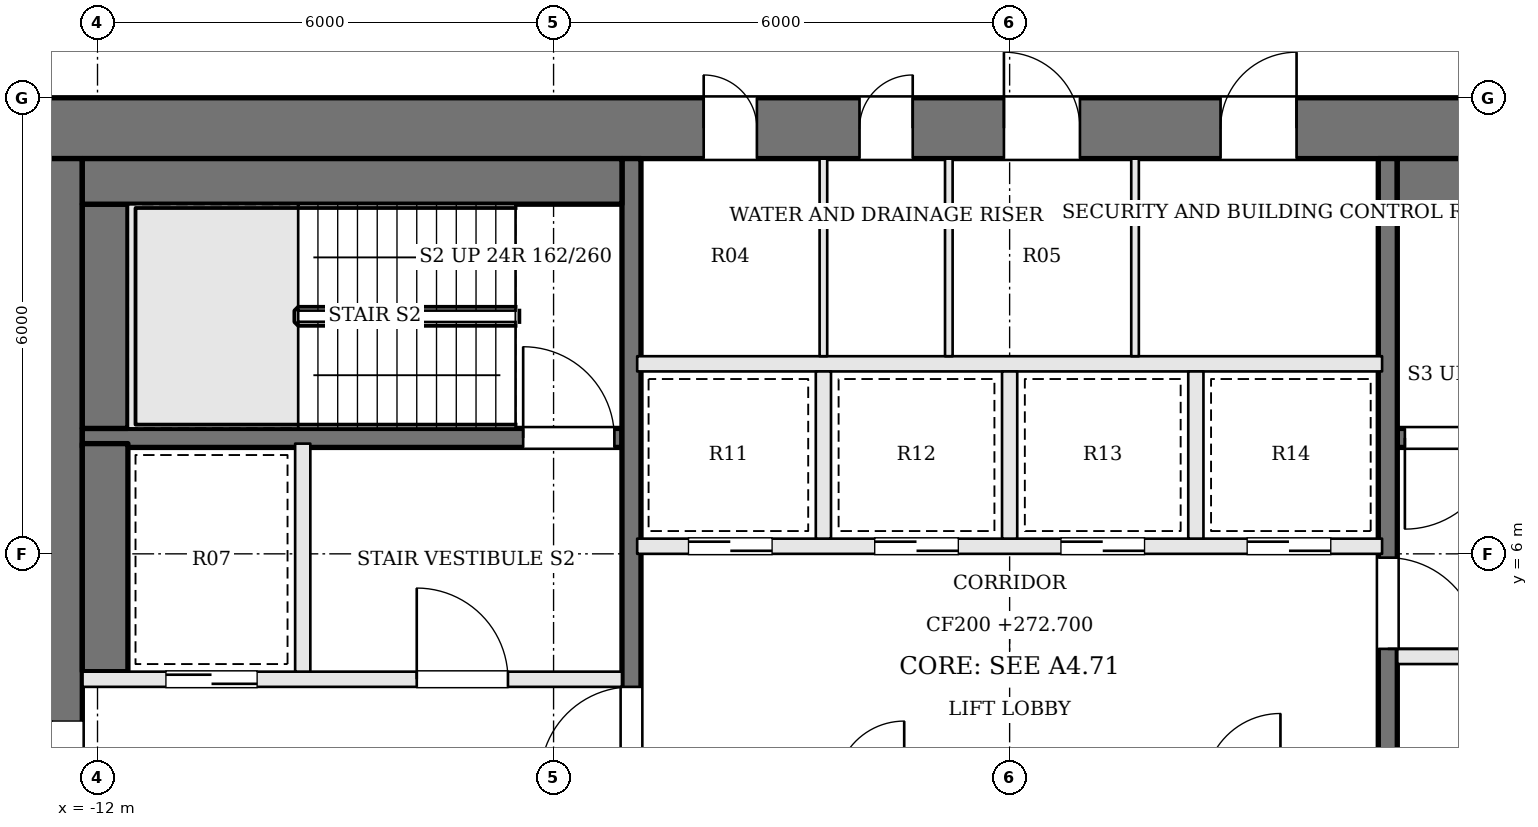
"""IFC4 building model, lengths in metres.
Left out: names, types, materials, properties, quantities, classifications, styles, units other than length and angle.
Written with IfcOpenShell. Run it as: python <this file> out.ifc"""

import sys

from ifc_helpers import new_model, si_unit, direction, frame, frame_2d, origin, place, context, subcontext, project, spatial, rectangle, extrude, element, fill, save


model = new_model("IFC4")
c1 = context("Model", 3, precision=1e-05, world=origin(), true_north=direction((0.0, 1.0)))
c2 = subcontext(c1, "Body", "Model", "MODEL_VIEW")
j1 = project(units=[si_unit("LENGTHUNIT", "METRE"), si_unit("PLANEANGLEUNIT", "RADIAN")], contexts=[c1])
p1 = place(None, origin())
s1 = spatial("IfcSite", under=j1, at=p1, CompositionType="ELEMENT")
p2 = place(p1, origin())
s2 = spatial("IfcBuilding", under=s1, at=p2, CompositionType="ELEMENT")
p3 = place(p2, frame((0.0, 0.0, 272.7)))
s3 = spatial("IfcBuildingStorey", under=s2, at=p3, CompositionType="ELEMENT", Elevation=272.7)
p4 = place(p3, frame((-13.0, 11.6, 0.0), z_axis=(0.0, 0.0, 1.0), x_axis=(1.0, 0.0, 0.0)))
e1 = element("IfcWall", 1, at=p4, inside=s3, PredefinedType="SHEAR", context=c2, shape_type="SweptSolid", body=[
    extrude(rectangle(XDim=26.0, YDim=0.8, at=frame_2d((13.0, 0.0))), origin(), (0.0, 0.0, 1.0), 3.9),
])
p5 = place(p4, frame((8.975, 0.0, 0.0)))
e2 = element("IfcOpeningElement", 2, at=p5, cuts=e1, PredefinedType="OPENING", context=c2, shape_type="SweptSolid", body=[
    extrude(rectangle(XDim=0.7, YDim=2.1, at=frame_2d((0.35, 1.05))), frame((0.0, 0.41, 0.0), z_axis=(0.0, -1.0, 0.0), x_axis=(1.0, 0.0, 0.0)), (0.0, 0.0, 1.0), 0.82),
])
p6 = place(p4, frame((11.025, 0.0, 0.0)))
e3 = element("IfcOpeningElement", 3, at=p6, cuts=e1, PredefinedType="OPENING", context=c2, shape_type="SweptSolid", body=[
    extrude(rectangle(XDim=0.7, YDim=2.1, at=frame_2d((0.35, 1.05))), frame((0.0, 0.41, 0.0), z_axis=(0.0, -1.0, 0.0), x_axis=(1.0, 0.0, 0.0)), (0.0, 0.0, 1.0), 0.82),
])
p7 = place(p4, frame((12.925, 0.0, 0.0)))
e4 = element("IfcOpeningElement", 4, at=p7, cuts=e1, PredefinedType="OPENING", context=c2, shape_type="SweptSolid", body=[
    extrude(rectangle(XDim=1.0, YDim=2.1, at=frame_2d((0.5, 1.05))), frame((0.0, 0.41, 0.0), z_axis=(0.0, -1.0, 0.0), x_axis=(1.0, 0.0, 0.0)), (0.0, 0.0, 1.0), 0.82),
])
p8 = place(p4, frame((15.775, 0.0, 0.0)))
e5 = element("IfcOpeningElement", 5, at=p8, cuts=e1, PredefinedType="OPENING", context=c2, shape_type="SweptSolid", body=[
    extrude(rectangle(XDim=1.0, YDim=2.1, at=frame_2d((0.5, 1.05))), frame((0.0, 0.41, 0.0), z_axis=(0.0, -1.0, 0.0), x_axis=(1.0, 0.0, 0.0)), (0.0, 0.0, 1.0), 0.82),
])
p9 = place(p3, frame((-12.6, -2.2, 0.0), z_axis=(0.0, 0.0, 1.0), x_axis=(0.0, 1.0, 0.0)))
e6 = element("IfcWall", 6, at=p9, inside=s3, PredefinedType="SHEAR", context=c2, shape_type="SweptSolid", body=[
    extrude(rectangle(XDim=13.4, YDim=0.8, at=frame_2d((6.7, 0.0))), origin(), (0.0, 0.0, 1.0), 3.9),
])
p10 = place(p9, frame((4.2, 0.0, 0.0)))
e7 = element("IfcOpeningElement", 7, at=p10, cuts=e6, PredefinedType="OPENING", context=c2, shape_type="SweptSolid", body=[
    extrude(rectangle(XDim=1.8, YDim=2.1, at=frame_2d((0.9, 1.05))), frame((0.0, 0.41, 0.0), z_axis=(0.0, -1.0, 0.0), x_axis=(1.0, 0.0, 0.0)), (0.0, 0.0, 1.0), 0.82),
])
p11 = place(p3, frame((12.2, 7.525, 0.0), z_axis=(0.0, 0.0, 1.0), x_axis=(-1.0, 0.0, 0.0)))
e8 = element("IfcWall", 8, at=p11, inside=s3, PredefinedType="SOLIDWALL", context=c2, shape_type="SweptSolid", body=[
    extrude(rectangle(XDim=7.1, YDim=0.25, at=frame_2d((3.55, 0.0))), origin(), (0.0, 0.0, 1.0), 3.7),
])
p12 = place(p11, frame((5.8, 0.0, 0.0)))
e9 = element("IfcOpeningElement", 9, at=p12, cuts=e8, PredefinedType="OPENING", context=c2, shape_type="SweptSolid", body=[
    extrude(rectangle(XDim=1.2, YDim=2.1, at=frame_2d((0.6, 1.05))), frame((0.0, 0.135, 0.0), z_axis=(0.0, -1.0, 0.0), x_axis=(1.0, 0.0, 0.0)), (0.0, 0.0, 1.0), 0.27),
])
p13 = place(p3, frame((-12.2, 4.35, 0.0), z_axis=(0.0, 0.0, 1.0), x_axis=(1.0, 0.0, 0.0)))
e10 = element("IfcWall", 10, at=p13, inside=s3, PredefinedType="SOLIDWALL", context=c2, shape_type="SweptSolid", body=[
    extrude(rectangle(XDim=7.1, YDim=0.2, at=frame_2d((3.55, 0.0))), origin(), (0.0, 0.0, 1.0), 3.7),
])
p14 = place(p13, frame((4.4, 0.0, 0.0)))
e11 = element("IfcOpeningElement", 11, at=p14, cuts=e10, PredefinedType="OPENING", context=c2, shape_type="SweptSolid", body=[
    extrude(rectangle(XDim=1.2, YDim=2.1, at=frame_2d((0.6, 1.05))), frame((0.0, 0.11, 0.0), z_axis=(0.0, -1.0, 0.0), x_axis=(1.0, 0.0, 0.0)), (0.0, 0.0, 1.0), 0.22),
])
p15 = place(p13, frame((1.1, 0.0, 0.0)))
e12 = element("IfcOpeningElement", 12, at=p15, cuts=e10, PredefinedType="OPENING", context=c2, shape_type="SweptSolid", body=[
    extrude(rectangle(XDim=1.2, YDim=2.1, at=frame_2d((0.6, 1.05))), frame((0.0, 0.11, 0.0), z_axis=(0.0, -1.0, 0.0), x_axis=(1.0, 0.0, 0.0)), (0.0, 0.0, 1.0), 0.22),
])
p16 = place(p3, frame((12.2, 4.65, 0.0), z_axis=(0.0, 0.0, 1.0), x_axis=(-1.0, 0.0, 0.0)))
e13 = element("IfcWall", 13, at=p16, inside=s3, PredefinedType="SOLIDWALL", context=c2, shape_type="SweptSolid", body=[
    extrude(rectangle(XDim=7.1, YDim=0.2, at=frame_2d((3.55, 0.0))), origin(), (0.0, 0.0, 1.0), 3.7),
])
p17 = place(p16, frame((4.4, 0.0, 0.0)))
e14 = element("IfcOpeningElement", 14, at=p17, cuts=e13, PredefinedType="OPENING", context=c2, shape_type="SweptSolid", body=[
    extrude(rectangle(XDim=1.2, YDim=2.1, at=frame_2d((0.6, 1.05))), frame((0.0, 0.11, 0.0), z_axis=(0.0, -1.0, 0.0), x_axis=(1.0, 0.0, 0.0)), (0.0, 0.0, 1.0), 0.22),
])
p18 = place(p16, frame((1.1, 0.0, 0.0)))
e15 = element("IfcOpeningElement", 15, at=p18, cuts=e13, PredefinedType="OPENING", context=c2, shape_type="SweptSolid", body=[
    extrude(rectangle(XDim=1.2, YDim=2.1, at=frame_2d((0.6, 1.05))), frame((0.0, 0.11, 0.0), z_axis=(0.0, -1.0, 0.0), x_axis=(1.0, 0.0, 0.0)), (0.0, 0.0, 1.0), 0.22),
])
p19 = place(p3, frame((-12.2, 7.525, 0.0), z_axis=(0.0, 0.0, 1.0), x_axis=(1.0, 0.0, 0.0)))
e16 = element("IfcWall", 16, at=p19, inside=s3, PredefinedType="SOLIDWALL", context=c2, shape_type="SweptSolid", body=[
    extrude(rectangle(XDim=7.1, YDim=0.25, at=frame_2d((3.55, 0.0))), origin(), (0.0, 0.0, 1.0), 3.7),
])
p20 = place(p19, frame((5.8, 0.0, 0.0)))
e17 = element("IfcOpeningElement", 17, at=p20, cuts=e16, PredefinedType="OPENING", context=c2, shape_type="SweptSolid", body=[
    extrude(rectangle(XDim=1.2, YDim=2.1, at=frame_2d((0.6, 1.05))), frame((0.0, 0.135, 0.0), z_axis=(0.0, -1.0, 0.0), x_axis=(1.0, 0.0, 0.0)), (0.0, 0.0, 1.0), 0.27),
])
p21 = place(p3, frame((-9.3, 4.45, 0.0), z_axis=(0.0, 0.0, 1.0), x_axis=(0.0, 1.0, 0.0)))
e18 = element("IfcWall", 18, at=p21, inside=s3, PredefinedType="SOLIDWALL", context=c2, shape_type="SweptSolid", body=[
    extrude(rectangle(XDim=3.0, YDim=0.2, at=frame_2d((1.5, 0.0))), origin(), (0.0, 0.0, 1.0), 3.7),
])
p22 = place(p3, frame((-4.975, -2.2, 0.0), z_axis=(0.0, 0.0, 1.0), x_axis=(0.0, 1.0, 0.0)))
e19 = element("IfcWall", 19, at=p22, inside=s3, PredefinedType="SOLIDWALL", context=c2, shape_type="SweptSolid", body=[
    extrude(rectangle(XDim=13.4, YDim=0.25, at=frame_2d((6.7, 0.0))), origin(), (0.0, 0.0, 1.0), 3.7),
])
p23 = place(p22, frame((5.25, 0.0, 0.0)))
e20 = element("IfcOpeningElement", 20, at=p23, cuts=e19, PredefinedType="OPENING", context=c2, shape_type="SweptSolid", body=[
    extrude(rectangle(XDim=1.2, YDim=2.1, at=frame_2d((0.6, 1.05))), frame((0.0, 0.135, 0.0), z_axis=(0.0, -1.0, 0.0), x_axis=(1.0, 0.0, 0.0)), (0.0, 0.0, 1.0), 0.27),
])
p24 = place(p3, frame((4.975, 11.2, 0.0), z_axis=(0.0, 0.0, 1.0), x_axis=(0.0, -1.0, 0.0)))
e21 = element("IfcWall", 21, at=p24, inside=s3, PredefinedType="SOLIDWALL", context=c2, shape_type="SweptSolid", body=[
    extrude(rectangle(XDim=13.4, YDim=0.25, at=frame_2d((6.7, 0.0))), origin(), (0.0, 0.0, 1.0), 3.7),
])
p25 = place(p24, frame((5.25, 0.0, 0.0)))
e22 = element("IfcOpeningElement", 22, at=p25, cuts=e21, PredefinedType="OPENING", context=c2, shape_type="SweptSolid", body=[
    extrude(rectangle(XDim=1.2, YDim=2.1, at=frame_2d((0.6, 1.05))), frame((0.0, 0.135, 0.0), z_axis=(0.0, -1.0, 0.0), x_axis=(1.0, 0.0, 0.0)), (0.0, 0.0, 1.0), 0.27),
])
p26 = place(p3, frame((-11.9, 4.45, 0.0), z_axis=(0.0, 0.0, 1.0), x_axis=(0.0, 1.0, 0.0)))
e23 = element("IfcWall", 23, at=p26, inside=s3, PredefinedType="SOLIDWALL", context=c2, shape_type="SweptSolid", body=[
    extrude(rectangle(XDim=3.0, YDim=0.6, at=frame_2d((1.5, 0.0))), origin(), (0.0, 0.0, 1.0), 3.7),
])
p27 = place(p3, frame((-11.9, 7.65, 0.0), z_axis=(0.0, 0.0, 1.0), x_axis=(0.0, 1.0, 0.0)))
e24 = element("IfcWall", 24, at=p27, inside=s3, PredefinedType="SOLIDWALL", context=c2, shape_type="SweptSolid", body=[
    extrude(rectangle(XDim=2.95, YDim=0.6, at=frame_2d((1.475, 0.0))), origin(), (0.0, 0.0, 1.0), 3.7),
])
for number, where, z_axis, x_axis in (
    (25, (-12.2, 10.9, 0.0), (0.0, 0.0, 1.0), (1.0, 0.0, 0.0)),
    (26, (12.2, 10.9, 0.0), (0.0, 0.0, 1.0), (-1.0, 0.0, 0.0)),
):
    element("IfcWall", number, at=place(p3, frame(where, z_axis=z_axis, x_axis=x_axis)), inside=s3, PredefinedType="SOLIDWALL", context=c2, shape_type="SweptSolid", body=[
        extrude(rectangle(XDim=7.1, YDim=0.6, at=frame_2d((3.55, 0.0))), origin(), (0.0, 0.0, 1.0), 3.7),
    ])
p28 = place(p3, frame((-4.9, 6.1, 0.0), z_axis=(0.0, 0.0, 1.0), x_axis=(1.0, 0.0, 0.0)))
e27 = element("IfcWall", 27, at=p28, inside=s3, PredefinedType="SOLIDWALL", context=c2, shape_type="SweptSolid", body=[
    extrude(rectangle(XDim=9.8, YDim=0.2, at=frame_2d((4.9, 0.0))), origin(), (0.0, 0.0, 1.0), 3.7),
])
p29 = place(p28, frame((0.675, 0.0, 0.0)))
e28 = element("IfcOpeningElement", 28, at=p29, cuts=e27, PredefinedType="OPENING", context=c2, shape_type="SweptSolid", body=[
    extrude(rectangle(XDim=1.1, YDim=2.1, at=frame_2d((0.55, 1.05))), frame((0.0, 0.11, 0.0), z_axis=(0.0, -1.0, 0.0), x_axis=(1.0, 0.0, 0.0)), (0.0, 0.0, 1.0), 0.22),
])
p30 = place(p28, frame((3.125, 0.0, 0.0)))
e29 = element("IfcOpeningElement", 29, at=p30, cuts=e27, PredefinedType="OPENING", context=c2, shape_type="SweptSolid", body=[
    extrude(rectangle(XDim=1.1, YDim=2.1, at=frame_2d((0.55, 1.05))), frame((0.0, 0.11, 0.0), z_axis=(0.0, -1.0, 0.0), x_axis=(1.0, 0.0, 0.0)), (0.0, 0.0, 1.0), 0.22),
])
p31 = place(p28, frame((5.575, 0.0, 0.0)))
e30 = element("IfcOpeningElement", 30, at=p31, cuts=e27, PredefinedType="OPENING", context=c2, shape_type="SweptSolid", body=[
    extrude(rectangle(XDim=1.1, YDim=2.1, at=frame_2d((0.55, 1.05))), frame((0.0, 0.11, 0.0), z_axis=(0.0, -1.0, 0.0), x_axis=(1.0, 0.0, 0.0)), (0.0, 0.0, 1.0), 0.22),
])
p32 = place(p28, frame((8.025, 0.0, 0.0)))
e31 = element("IfcOpeningElement", 31, at=p32, cuts=e27, PredefinedType="OPENING", context=c2, shape_type="SweptSolid", body=[
    extrude(rectangle(XDim=1.1, YDim=2.1, at=frame_2d((0.55, 1.05))), frame((0.0, 0.11, 0.0), z_axis=(0.0, -1.0, 0.0), x_axis=(1.0, 0.0, 0.0)), (0.0, 0.0, 1.0), 0.22),
])
p33 = place(p3, frame((-4.9, 8.5, 0.0), z_axis=(0.0, 0.0, 1.0), x_axis=(1.0, 0.0, 0.0)))
e32 = element("IfcWall", 32, at=p33, inside=s3, PredefinedType="SOLIDWALL", context=c2, shape_type="SweptSolid", body=[
    extrude(rectangle(XDim=9.8, YDim=0.2, at=frame_2d((4.9, 0.0))), origin(), (0.0, 0.0, 1.0), 3.7),
])
for number, where, z_axis, x_axis in (
    (33, (-2.45, 6.2, 0.0), (0.0, 0.0, 1.0), (0.0, 1.0, 0.0)),
    (34, (0.0, 6.2, 0.0), (0.0, 0.0, 1.0), (0.0, 1.0, 0.0)),
    (35, (2.45, 6.2, 0.0), (0.0, 0.0, 1.0), (0.0, 1.0, 0.0)),
):
    element("IfcWall", number, at=place(p3, frame(where, z_axis=z_axis, x_axis=x_axis)), inside=s3, PredefinedType="SOLIDWALL", context=c2, shape_type="SweptSolid", body=[
        extrude(rectangle(XDim=2.2, YDim=0.2, at=frame_2d((1.1, 0.0))), origin(), (0.0, 0.0, 1.0), 3.7),
    ])
for number, where, z_axis, x_axis in (
    (36, (-2.45, 8.6, 0.0), (0.0, 0.0, 1.0), (0.0, 1.0, 0.0)),
    (37, (-0.8, 8.6, 0.0), (0.0, 0.0, 1.0), (0.0, 1.0, 0.0)),
    (38, (1.65, 8.6, 0.0), (0.0, 0.0, 1.0), (0.0, 1.0, 0.0)),
):
    element("IfcWall", number, at=place(p3, frame(where, z_axis=z_axis, x_axis=x_axis)), inside=s3, PredefinedType="PARTITIONING", context=c2, shape_type="SweptSolid", body=[
        extrude(rectangle(XDim=2.6, YDim=0.1, at=frame_2d((1.3, 0.0))), origin(), (0.0, 0.0, 1.0), 3.7),
    ])
p34 = place(p10, origin())
e39 = element("IfcDoor", 39, at=p34, inside=s3, OperationType="DOUBLE_DOOR_SINGLE_SWING", PredefinedType="DOOR", context=c2, shape_type="SweptSolid", body=[
    extrude(rectangle(XDim=1.8, YDim=2.1, at=frame_2d((0.9, 1.05))), frame((0.0, 0.025, 0.0), z_axis=(0.0, -1.0, 0.0), x_axis=(1.0, 0.0, 0.0)), (0.0, 0.0, 1.0), 0.05),
])
fill(e7, e39)
p35 = place(p23, origin())
e40 = element("IfcDoor", 40, at=p35, inside=s3, OperationType="SINGLE_SWING_LEFT", PredefinedType="DOOR", context=c2, shape_type="SweptSolid", body=[
    extrude(rectangle(XDim=1.2, YDim=2.1, at=frame_2d((0.6, 1.05))), frame((0.0, 0.025, 0.0), z_axis=(0.0, -1.0, 0.0), x_axis=(1.0, 0.0, 0.0)), (0.0, 0.0, 1.0), 0.05),
])
fill(e20, e40)
p36 = place(p25, origin())
e41 = element("IfcDoor", 41, at=p36, inside=s3, OperationType="SINGLE_SWING_RIGHT", PredefinedType="DOOR", context=c2, shape_type="SweptSolid", body=[
    extrude(rectangle(XDim=1.2, YDim=2.1, at=frame_2d((0.6, 1.05))), frame((0.0, 0.025, 0.0), z_axis=(0.0, -1.0, 0.0), x_axis=(1.0, 0.0, 0.0)), (0.0, 0.0, 1.0), 0.05),
])
fill(e22, e41)
p37 = place(p14, origin())
e42 = element("IfcDoor", 42, at=p37, inside=s3, OperationType="SINGLE_SWING_LEFT", PredefinedType="DOOR", context=c2, shape_type="SweptSolid", body=[
    extrude(rectangle(XDim=1.2, YDim=2.1, at=frame_2d((0.6, 1.05))), frame((0.0, 0.025, 0.0), z_axis=(0.0, -1.0, 0.0), x_axis=(1.0, 0.0, 0.0)), (0.0, 0.0, 1.0), 0.05),
])
fill(e11, e42)
p38 = place(p12, origin())
e43 = element("IfcDoor", 43, at=p38, inside=s3, OperationType="SINGLE_SWING_RIGHT", PredefinedType="DOOR", context=c2, shape_type="SweptSolid", body=[
    extrude(rectangle(XDim=1.2, YDim=2.1, at=frame_2d((0.6, 1.05))), frame((0.0, 0.025, 0.0), z_axis=(0.0, -1.0, 0.0), x_axis=(1.0, 0.0, 0.0)), (0.0, 0.0, 1.0), 0.05),
])
fill(e9, e43)
p39 = place(p20, origin())
e44 = element("IfcDoor", 44, at=p39, inside=s3, OperationType="SINGLE_SWING_LEFT", PredefinedType="DOOR", context=c2, shape_type="SweptSolid", body=[
    extrude(rectangle(XDim=1.2, YDim=2.1, at=frame_2d((0.6, 1.05))), frame((0.0, 0.025, 0.0), z_axis=(0.0, -1.0, 0.0), x_axis=(1.0, 0.0, 0.0)), (0.0, 0.0, 1.0), 0.05),
])
fill(e17, e44)
p40 = place(p15, origin())
e45 = element("IfcDoor", 45, at=p40, inside=s3, OperationType="SLIDING_TO_RIGHT", PredefinedType="DOOR", context=c2, shape_type="SweptSolid", body=[
    extrude(rectangle(XDim=1.2, YDim=2.1, at=frame_2d((0.6, 1.05))), frame((0.0, 0.025, 0.0), z_axis=(0.0, -1.0, 0.0), x_axis=(1.0, 0.0, 0.0)), (0.0, 0.0, 1.0), 0.05),
])
fill(e12, e45)
p41 = place(p29, origin())
e46 = element("IfcDoor", 46, at=p41, inside=s3, OperationType="SLIDING_TO_RIGHT", PredefinedType="DOOR", context=c2, shape_type="SweptSolid", body=[
    extrude(rectangle(XDim=1.1, YDim=2.1, at=frame_2d((0.55, 1.05))), frame((0.0, 0.025, 0.0), z_axis=(0.0, -1.0, 0.0), x_axis=(1.0, 0.0, 0.0)), (0.0, 0.0, 1.0), 0.05),
])
fill(e28, e46)
p42 = place(p30, origin())
e47 = element("IfcDoor", 47, at=p42, inside=s3, OperationType="SLIDING_TO_LEFT", PredefinedType="DOOR", context=c2, shape_type="SweptSolid", body=[
    extrude(rectangle(XDim=1.1, YDim=2.1, at=frame_2d((0.55, 1.05))), frame((0.0, 0.025, 0.0), z_axis=(0.0, -1.0, 0.0), x_axis=(1.0, 0.0, 0.0)), (0.0, 0.0, 1.0), 0.05),
])
fill(e29, e47)
p43 = place(p31, origin())
e48 = element("IfcDoor", 48, at=p43, inside=s3, OperationType="SLIDING_TO_RIGHT", PredefinedType="DOOR", context=c2, shape_type="SweptSolid", body=[
    extrude(rectangle(XDim=1.1, YDim=2.1, at=frame_2d((0.55, 1.05))), frame((0.0, 0.025, 0.0), z_axis=(0.0, -1.0, 0.0), x_axis=(1.0, 0.0, 0.0)), (0.0, 0.0, 1.0), 0.05),
])
fill(e30, e48)
p44 = place(p32, origin())
e49 = element("IfcDoor", 49, at=p44, inside=s3, OperationType="SLIDING_TO_LEFT", PredefinedType="DOOR", context=c2, shape_type="SweptSolid", body=[
    extrude(rectangle(XDim=1.1, YDim=2.1, at=frame_2d((0.55, 1.05))), frame((0.0, 0.025, 0.0), z_axis=(0.0, -1.0, 0.0), x_axis=(1.0, 0.0, 0.0)), (0.0, 0.0, 1.0), 0.05),
])
fill(e31, e49)
p45 = place(p5, origin())
e50 = element("IfcDoor", 50, at=p45, inside=s3, OperationType="SINGLE_SWING_LEFT", PredefinedType="DOOR", context=c2, shape_type="SweptSolid", body=[
    extrude(rectangle(XDim=0.7, YDim=2.1, at=frame_2d((0.35, 1.05))), frame((0.0, 0.025, 0.0), z_axis=(0.0, -1.0, 0.0), x_axis=(1.0, 0.0, 0.0)), (0.0, 0.0, 1.0), 0.05),
])
fill(e2, e50)
p46 = place(p6, origin())
e51 = element("IfcDoor", 51, at=p46, inside=s3, OperationType="SINGLE_SWING_RIGHT", PredefinedType="DOOR", context=c2, shape_type="SweptSolid", body=[
    extrude(rectangle(XDim=0.7, YDim=2.1, at=frame_2d((0.35, 1.05))), frame((0.0, 0.025, 0.0), z_axis=(0.0, -1.0, 0.0), x_axis=(1.0, 0.0, 0.0)), (0.0, 0.0, 1.0), 0.05),
])
fill(e3, e51)
p47 = place(p7, origin())
e52 = element("IfcDoor", 52, at=p47, inside=s3, OperationType="SINGLE_SWING_LEFT", PredefinedType="DOOR", context=c2, shape_type="SweptSolid", body=[
    extrude(rectangle(XDim=1.0, YDim=2.1, at=frame_2d((0.5, 1.05))), frame((0.0, 0.025, 0.0), z_axis=(0.0, -1.0, 0.0), x_axis=(1.0, 0.0, 0.0)), (0.0, 0.0, 1.0), 0.05),
])
fill(e4, e52)
p48 = place(p8, origin())
e53 = element("IfcDoor", 53, at=p48, inside=s3, OperationType="SINGLE_SWING_RIGHT", PredefinedType="DOOR", context=c2, shape_type="SweptSolid", body=[
    extrude(rectangle(XDim=1.0, YDim=2.1, at=frame_2d((0.5, 1.05))), frame((0.0, 0.025, 0.0), z_axis=(0.0, -1.0, 0.0), x_axis=(1.0, 0.0, 0.0)), (0.0, 0.0, 1.0), 0.05),
])
fill(e5, e53)
save(model, sys.argv[1])
